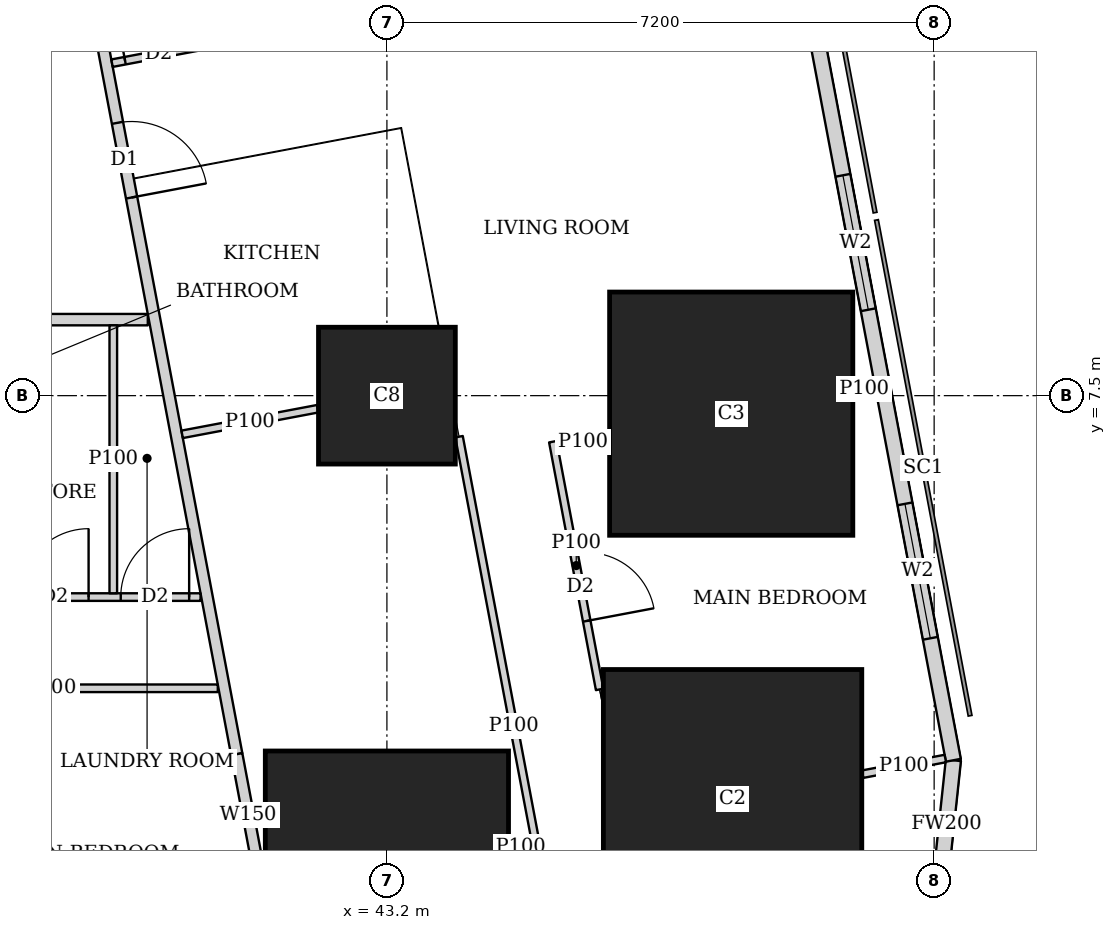
"""IFC4 building model, lengths in metres.
Left out: names, types, materials, properties, quantities, classifications, styles, units other than length and angle.
Written with IfcOpenShell. Run it as: python <this file> out.ifc"""

import sys

from ifc_helpers import new_model, si_unit, direction, frame, frame_2d, origin, origin_2d, place, context, subcontext, project, spatial, rectangle, extrude, element, fill, save


model = new_model("IFC4")
c1 = context("Model", 3, precision=1e-05, world=origin(), true_north=direction((0.0, 1.0)))
c2 = subcontext(c1, "Body", "Model", "MODEL_VIEW")
j1 = project(units=[si_unit("LENGTHUNIT", "METRE"), si_unit("PLANEANGLEUNIT", "RADIAN")], contexts=[c1])
p1 = place(None, origin())
s1 = spatial("IfcSite", under=j1, at=p1, CompositionType="ELEMENT")
p2 = place(p1, origin())
s2 = spatial("IfcBuilding", under=s1, at=p2, CompositionType="ELEMENT")
p3 = place(p2, frame((0.0, 0.0, 23.75)))
s3 = spatial("IfcBuildingStorey", under=s2, at=p3, CompositionType="ELEMENT", Elevation=23.75)
p4 = place(p3, frame((43.2, 1.225, 0.0), z_axis=(0.0, 0.0, 1.0), x_axis=(1.0, 0.0, 0.0)))
e1 = element("IfcColumn", 1, at=p4, inside=s3, PredefinedType="COLUMN", context=c2, shape_type="SweptSolid", body=[
    extrude(rectangle(XDim=3.2, YDim=3.2, at=origin_2d()), origin(), (0.0, 0.0, 1.0), 3.75),
])
p5 = place(p3, frame((47.748, 2.197, 0.0), z_axis=(0.0, 0.0, 1.0), x_axis=(1.0, 0.0, 0.0)))
e2 = element("IfcColumn", 2, at=p5, inside=s3, PredefinedType="COLUMN", context=c2, shape_type="SweptSolid", body=[
    extrude(rectangle(XDim=3.4, YDim=3.4, at=origin_2d()), origin(), (0.0, 0.0, 1.0), 3.75),
])
p6 = place(p3, frame((43.2, 7.5, 0.0), z_axis=(0.0, 0.0, 1.0), x_axis=(1.0, 0.0, 0.0)))
e3 = element("IfcColumn", 3, at=p6, inside=s3, PredefinedType="COLUMN", context=c2, shape_type="SweptSolid", body=[
    extrude(rectangle(XDim=1.8, YDim=1.8, at=origin_2d()), origin(), (0.0, 0.0, 1.0), 3.75),
])
p7 = place(p3, frame((47.73, 7.263, 0.0), z_axis=(0.0, 0.0, 1.0), x_axis=(1.0, 0.0, 0.0)))
e4 = element("IfcColumn", 4, at=p7, inside=s3, PredefinedType="COLUMN", context=c2, shape_type="SweptSolid", body=[
    extrude(rectangle(XDim=3.2, YDim=3.2, at=origin_2d()), origin(), (0.0, 0.0, 1.0), 3.75),
])
p8 = place(p3, frame((50.474, 1.025, 0.0), z_axis=(0.0, 0.0, 1.0), x_axis=(0.106047815515, 0.994361031429, 0.0)))
e5 = element("IfcWall", 5, at=p8, inside=s3, PredefinedType="SOLIDWALL", context=c2, shape_type="SweptSolid", body=[
    extrude(rectangle(XDim=1.688, YDim=0.2, at=frame_2d((0.844, 0.0))), origin(), (0.0, 0.0, 1.0), 3.5),
])
p9 = place(p3, frame((50.653, 2.703, 0.0), z_axis=(0.0, 0.0, 1.0), x_axis=(-0.185612026696, 0.982623109613, 0.0)))
e6 = element("IfcWall", 6, at=p9, inside=s3, PredefinedType="SOLIDWALL", context=c2, shape_type="SweptSolid", body=[
    extrude(rectangle(XDim=41.393, YDim=0.2, at=frame_2d((20.697, 0.0))), origin(), (0.0, 0.0, 1.0), 3.5),
])
p10 = place(p9, frame((1.633, 0.0, 0.9)))
e7 = element("IfcOpeningElement", 7, at=p10, cuts=e6, PredefinedType="OPENING", context=c2, shape_type="SweptSolid", body=[
    extrude(rectangle(XDim=1.8, YDim=1.5, at=frame_2d((0.9, 0.75))), frame((0.0, 0.11, 0.0), z_axis=(0.0, -1.0, 0.0), x_axis=(1.0, 0.0, 0.0)), (0.0, 0.0, 1.0), 0.22),
])
p11 = place(p9, frame((6.032, 0.0, 0.9)))
e8 = element("IfcOpeningElement", 8, at=p11, cuts=e6, PredefinedType="OPENING", context=c2, shape_type="SweptSolid", body=[
    extrude(rectangle(XDim=1.8, YDim=1.5, at=frame_2d((0.9, 0.75))), frame((0.0, 0.11, 0.0), z_axis=(0.0, -1.0, 0.0), x_axis=(1.0, 0.0, 0.0)), (0.0, 0.0, 1.0), 0.22),
])
p12 = place(p9, frame((9.848, 0.0, 0.9)))
e9 = element("IfcOpeningElement", 9, at=p12, cuts=e6, PredefinedType="OPENING", context=c2, shape_type="SweptSolid", body=[
    extrude(rectangle(XDim=1.8, YDim=1.5, at=frame_2d((0.9, 0.75))), frame((0.0, 0.11, 0.0), z_axis=(0.0, -1.0, 0.0), x_axis=(1.0, 0.0, 0.0)), (0.0, 0.0, 1.0), 0.22),
])
p13 = place(p9, frame((17.481, 0.0, 0.9)))
e10 = element("IfcOpeningElement", 10, at=p13, cuts=e6, PredefinedType="OPENING", context=c2, shape_type="SweptSolid", body=[
    extrude(rectangle(XDim=1.8, YDim=1.5, at=frame_2d((0.9, 0.75))), frame((0.0, 0.11, 0.0), z_axis=(0.0, -1.0, 0.0), x_axis=(1.0, 0.0, 0.0)), (0.0, 0.0, 1.0), 0.22),
])
p14 = place(p9, frame((21.297, 0.0, 0.9)))
e11 = element("IfcOpeningElement", 11, at=p14, cuts=e6, PredefinedType="OPENING", context=c2, shape_type="SweptSolid", body=[
    extrude(rectangle(XDim=1.8, YDim=1.5, at=frame_2d((0.9, 0.75))), frame((0.0, 0.11, 0.0), z_axis=(0.0, -1.0, 0.0), x_axis=(1.0, 0.0, 0.0)), (0.0, 0.0, 1.0), 0.22),
])
p15 = place(p9, frame((25.113, 0.0, 0.9)))
e12 = element("IfcOpeningElement", 12, at=p15, cuts=e6, PredefinedType="OPENING", context=c2, shape_type="SweptSolid", body=[
    extrude(rectangle(XDim=1.8, YDim=1.5, at=frame_2d((0.9, 0.75))), frame((0.0, 0.11, 0.0), z_axis=(0.0, -1.0, 0.0), x_axis=(1.0, 0.0, 0.0)), (0.0, 0.0, 1.0), 0.22),
])
p16 = place(p9, frame((28.93, 0.0, 0.9)))
e13 = element("IfcOpeningElement", 13, at=p16, cuts=e6, PredefinedType="OPENING", context=c2, shape_type="SweptSolid", body=[
    extrude(rectangle(XDim=1.8, YDim=1.5, at=frame_2d((0.9, 0.75))), frame((0.0, 0.11, 0.0), z_axis=(0.0, -1.0, 0.0), x_axis=(1.0, 0.0, 0.0)), (0.0, 0.0, 1.0), 0.22),
])
p17 = place(p9, frame((32.746, 0.0, 0.9)))
e14 = element("IfcOpeningElement", 14, at=p17, cuts=e6, PredefinedType="OPENING", context=c2, shape_type="SweptSolid", body=[
    extrude(rectangle(XDim=1.8, YDim=1.5, at=frame_2d((0.9, 0.75))), frame((0.0, 0.11, 0.0), z_axis=(0.0, -1.0, 0.0), x_axis=(1.0, 0.0, 0.0)), (0.0, 0.0, 1.0), 0.22),
])
p18 = place(p9, frame((36.481, 0.0, 0.9)))
e15 = element("IfcOpeningElement", 15, at=p18, cuts=e6, PredefinedType="OPENING", context=c2, shape_type="SweptSolid", body=[
    extrude(rectangle(XDim=1.8, YDim=1.5, at=frame_2d((0.9, 0.75))), frame((0.0, 0.11, 0.0), z_axis=(0.0, -1.0, 0.0), x_axis=(1.0, 0.0, 0.0)), (0.0, 0.0, 1.0), 0.22),
])
p19 = place(p3, frame((40.054, 8.5, 0.0), z_axis=(0.0, 0.0, 1.0), x_axis=(-1.0, 0.0, 0.0)))
e16 = element("IfcWall", 16, at=p19, inside=s3, PredefinedType="SOLIDWALL", context=c2, shape_type="SweptSolid", body=[
    extrude(rectangle(XDim=31.704, YDim=0.15, at=frame_2d((15.852, 0.0))), origin(), (0.0, 0.0, 1.0), 3.5),
])
p20 = place(p19, frame((27.321, 0.0, 0.0)))
e17 = element("IfcOpeningElement", 17, at=p20, cuts=e16, PredefinedType="OPENING", context=c2, shape_type="SweptSolid", body=[
    extrude(rectangle(XDim=1.0, YDim=2.1, at=frame_2d((0.5, 1.05))), frame((0.0, 0.085, 0.0), z_axis=(0.0, -1.0, 0.0), x_axis=(1.0, 0.0, 0.0)), (0.0, 0.0, 1.0), 0.17),
])
p21 = place(p19, frame((23.054, 0.0, 0.0)))
e18 = element("IfcOpeningElement", 18, at=p21, cuts=e16, PredefinedType="OPENING", context=c2, shape_type="SweptSolid", body=[
    extrude(rectangle(XDim=1.0, YDim=2.1, at=frame_2d((0.5, 1.05))), frame((0.0, 0.085, 0.0), z_axis=(0.0, -1.0, 0.0), x_axis=(1.0, 0.0, 0.0)), (0.0, 0.0, 1.0), 0.17),
])
p22 = place(p19, frame((15.754, 0.0, 0.0)))
e19 = element("IfcOpeningElement", 19, at=p22, cuts=e16, PredefinedType="OPENING", context=c2, shape_type="SweptSolid", body=[
    extrude(rectangle(XDim=1.0, YDim=2.1, at=frame_2d((0.5, 1.05))), frame((0.0, 0.085, 0.0), z_axis=(0.0, -1.0, 0.0), x_axis=(1.0, 0.0, 0.0)), (0.0, 0.0, 1.0), 0.17),
])
p23 = place(p19, frame((5.754, 0.0, 0.0)))
e20 = element("IfcOpeningElement", 20, at=p23, cuts=e16, PredefinedType="OPENING", context=c2, shape_type="SweptSolid", body=[
    extrude(rectangle(XDim=1.0, YDim=2.1, at=frame_2d((0.5, 1.05))), frame((0.0, 0.085, 0.0), z_axis=(0.0, -1.0, 0.0), x_axis=(1.0, 0.0, 0.0)), (0.0, 0.0, 1.0), 0.17),
])
p24 = place(p3, frame((33.755, 42.325, 0.0), z_axis=(0.0, 0.0, 1.0), x_axis=(0.185611461091, -0.982623216453, 0.0)))
e21 = element("IfcWall", 21, at=p24, inside=s3, PredefinedType="SOLIDWALL", context=c2, shape_type="SweptSolid", body=[
    extrude(rectangle(XDim=40.241, YDim=0.15, at=frame_2d((20.121, 0.0))), origin(), (0.0, 0.0, 1.0), 2.5),
])
p25 = place(p24, frame((7.325, 0.0, 0.0)))
e22 = element("IfcOpeningElement", 22, at=p25, cuts=e21, PredefinedType="OPENING", context=c2, shape_type="SweptSolid", body=[
    extrude(rectangle(XDim=1.0, YDim=2.1, at=frame_2d((0.5, 1.05))), frame((0.0, 0.085, 0.0), z_axis=(0.0, -1.0, 0.0), x_axis=(1.0, 0.0, 0.0)), (0.0, 0.0, 1.0), 0.17),
])
p26 = place(p24, frame((11.902, 0.0, 0.0)))
e23 = element("IfcOpeningElement", 23, at=p26, cuts=e21, PredefinedType="OPENING", context=c2, shape_type="SweptSolid", body=[
    extrude(rectangle(XDim=1.0, YDim=2.1, at=frame_2d((0.5, 1.05))), frame((0.0, 0.085, 0.0), z_axis=(0.0, -1.0, 0.0), x_axis=(1.0, 0.0, 0.0)), (0.0, 0.0, 1.0), 0.17),
])
p27 = place(p24, frame((25.718, 0.0, 0.0)))
e24 = element("IfcOpeningElement", 24, at=p27, cuts=e21, PredefinedType="OPENING", context=c2, shape_type="SweptSolid", body=[
    extrude(rectangle(XDim=1.0, YDim=2.1, at=frame_2d((0.5, 1.05))), frame((0.0, 0.085, 0.0), z_axis=(0.0, -1.0, 0.0), x_axis=(1.0, 0.0, 0.0)), (0.0, 0.0, 1.0), 0.17),
])
p28 = place(p24, frame((31.788, 0.0, 0.0)))
e25 = element("IfcOpeningElement", 25, at=p28, cuts=e21, PredefinedType="OPENING", context=c2, shape_type="SweptSolid", body=[
    extrude(rectangle(XDim=1.0, YDim=2.1, at=frame_2d((0.5, 1.05))), frame((0.0, 0.085, 0.0), z_axis=(0.0, -1.0, 0.0), x_axis=(1.0, 0.0, 0.0)), (0.0, 0.0, 1.0), 0.17),
])
p29 = place(p3, frame((41.224, 2.783, 0.0), z_axis=(0.0, 0.0, 1.0), x_axis=(0.185566507215, -0.982631706897, 0.0)))
e26 = element("IfcWall", 26, at=p29, inside=s3, PredefinedType="SOLIDWALL", context=c2, shape_type="SweptSolid", body=[
    extrude(rectangle(XDim=1.626, YDim=0.15, at=frame_2d((0.813, 0.0))), origin(), (0.0, 0.0, 1.0), 2.05),
])
p30 = place(p3, frame((40.975, 3.65, 0.0), z_axis=(0.0, 0.0, 1.0), x_axis=(-1.0, 0.0, 0.0)))
e27 = element("IfcWall", 27, at=p30, inside=s3, PredefinedType="PARTITIONING", context=c2, shape_type="SweptSolid", body=[
    extrude(rectangle(XDim=4.975, YDim=0.1, at=frame_2d((2.488, 0.0))), origin(), (0.0, 0.0, 1.0), 3.5),
])
p31 = place(p30, frame((2.45, 0.0, 0.0)))
e28 = element("IfcOpeningElement", 28, at=p31, cuts=e27, PredefinedType="OPENING", context=c2, shape_type="SweptSolid", body=[
    extrude(rectangle(XDim=0.9, YDim=2.1, at=frame_2d((0.45, 1.05))), frame((0.0, 0.06, 0.0), z_axis=(0.0, -1.0, 0.0), x_axis=(1.0, 0.0, 0.0)), (0.0, 0.0, 1.0), 0.12),
])
p32 = place(p3, frame((40.748, 4.85, 0.0), z_axis=(0.0, 0.0, 1.0), x_axis=(-1.0, 0.0, 0.0)))
e29 = element("IfcWall", 29, at=p32, inside=s3, PredefinedType="PARTITIONING", context=c2, shape_type="SweptSolid", body=[
    extrude(rectangle(XDim=4.748, YDim=0.1, at=frame_2d((2.374, 0.0))), origin(), (0.0, 0.0, 1.0), 3.5),
])
p33 = place(p32, frame((3.273, 0.0, 0.0)))
e30 = element("IfcOpeningElement", 30, at=p33, cuts=e29, PredefinedType="OPENING", context=c2, shape_type="SweptSolid", body=[
    extrude(rectangle(XDim=0.9, YDim=2.1, at=frame_2d((0.45, 1.05))), frame((0.0, 0.06, 0.0), z_axis=(0.0, -1.0, 0.0), x_axis=(1.0, 0.0, 0.0)), (0.0, 0.0, 1.0), 0.12),
])
p34 = place(p32, frame((0.15, 0.0, 0.0)))
e31 = element("IfcOpeningElement", 31, at=p34, cuts=e29, PredefinedType="OPENING", context=c2, shape_type="SweptSolid", body=[
    extrude(rectangle(XDim=0.9, YDim=2.1, at=frame_2d((0.45, 1.05))), frame((0.0, 0.06, 0.0), z_axis=(0.0, -1.0, 0.0), x_axis=(1.0, 0.0, 0.0)), (0.0, 0.0, 1.0), 0.12),
])
p35 = place(p32, frame((1.473, 0.0, 0.0)))
e32 = element("IfcOpeningElement", 32, at=p35, cuts=e29, PredefinedType="OPENING", context=c2, shape_type="SweptSolid", body=[
    extrude(rectangle(XDim=0.9, YDim=2.1, at=frame_2d((0.45, 1.05))), frame((0.0, 0.06, 0.0), z_axis=(0.0, -1.0, 0.0), x_axis=(1.0, 0.0, 0.0)), (0.0, 0.0, 1.0), 0.12),
])
p36 = place(p3, frame((39.6, 4.9, 0.0), z_axis=(0.0, 0.0, 1.0), x_axis=(0.0, 1.0, 0.0)))
e33 = element("IfcWall", 33, at=p36, inside=s3, PredefinedType="PARTITIONING", context=c2, shape_type="SweptSolid", body=[
    extrude(rectangle(XDim=3.525, YDim=0.1, at=frame_2d((1.763, 0.0))), origin(), (0.0, 0.0, 1.0), 3.5),
])
p37 = place(p3, frame((43.145, 12.547, 0.0), z_axis=(0.0, 0.0, 1.0), x_axis=(-0.982610451136, -0.185679027675, 0.0)))
e34 = element("IfcWall", 34, at=p37, inside=s3, PredefinedType="PARTITIONING", context=c2, shape_type="SweptSolid", body=[
    extrude(rectangle(XDim=3.625, YDim=0.1, at=frame_2d((1.812, 0.0))), origin(), (0.0, 0.0, 1.0), 3.5),
])
p38 = place(p37, frame((2.55, 0.0, 0.0)))
e35 = element("IfcOpeningElement", 35, at=p38, cuts=e34, PredefinedType="OPENING", context=c2, shape_type="SweptSolid", body=[
    extrude(rectangle(XDim=0.9, YDim=2.1, at=frame_2d((0.45, 1.05))), frame((0.0, 0.06, 0.0), z_axis=(0.0, -1.0, 0.0), x_axis=(1.0, 0.0, 0.0)), (0.0, 0.0, 1.0), 0.12),
])
p39 = place(p3, frame((45.383, 6.894, 0.0), z_axis=(0.0, 0.0, 1.0), x_axis=(0.185714962489, -0.982603660032, 0.0)))
e36 = element("IfcWall", 36, at=p39, inside=s3, PredefinedType="PARTITIONING", context=c2, shape_type="SweptSolid", body=[
    extrude(rectangle(XDim=3.317, YDim=0.1, at=frame_2d((1.658, 0.0))), origin(), (0.0, 0.0, 1.0), 3.5),
])
p40 = place(p39, frame((1.5, 0.0, 0.0)))
e37 = element("IfcOpeningElement", 37, at=p40, cuts=e36, PredefinedType="OPENING", context=c2, shape_type="SweptSolid", body=[
    extrude(rectangle(XDim=0.9, YDim=2.1, at=frame_2d((0.45, 1.05))), frame((0.0, 0.06, 0.0), z_axis=(0.0, -1.0, 0.0), x_axis=(1.0, 0.0, 0.0)), (0.0, 0.0, 1.0), 0.12),
])
p41 = place(p3, frame((44.149, 6.96, 0.0), z_axis=(0.0, 0.0, 1.0), x_axis=(0.185677796828, -0.982610683722, 0.0)))
e38 = element("IfcWall", 38, at=p41, inside=s3, PredefinedType="PARTITIONING", context=c2, shape_type="SweptSolid", body=[
    extrude(rectangle(XDim=7.745, YDim=0.1, at=frame_2d((3.872, 0.0))), origin(), (0.0, 0.0, 1.0), 2.1),
])
p42 = place(p3, frame((49.622, 7.62, 0.0), z_axis=(0.0, 0.0, 1.0), x_axis=(-0.982649953213, -0.185469861299, 0.0)))
e39 = element("IfcWall", 39, at=p42, inside=s3, PredefinedType="PARTITIONING", context=c2, shape_type="SweptSolid", body=[
    extrude(rectangle(XDim=0.287, YDim=0.1, at=frame_2d((0.144, 0.0))), origin(), (0.0, 0.0, 1.0), 3.5),
])
p43 = place(p3, frame((46.12, 6.959, 0.0), z_axis=(0.0, 0.0, 1.0), x_axis=(-0.982722777639, -0.185083608972, 0.0)))
e40 = element("IfcWall", 40, at=p43, inside=s3, PredefinedType="PARTITIONING", context=c2, shape_type="SweptSolid", body=[
    extrude(rectangle(XDim=0.686, YDim=0.1, at=frame_2d((0.343, 0.0))), origin(), (0.0, 0.0, 1.0), 3.5),
])
p44 = place(p3, frame((50.547, 2.726, 0.0), z_axis=(0.0, 0.0, 1.0), x_axis=(-0.982569158372, -0.185897415303, 0.0)))
e41 = element("IfcWall", 41, at=p44, inside=s3, PredefinedType="PARTITIONING", context=c2, shape_type="SweptSolid", body=[
    extrude(rectangle(XDim=1.108, YDim=0.1, at=frame_2d((0.554, 0.0))), origin(), (0.0, 0.0, 1.0), 3.5),
])
p45 = place(p3, frame((42.29, 7.328, 0.0), z_axis=(0.0, 0.0, 1.0), x_axis=(-0.98262927905, -0.185579362952, 0.0)))
e42 = element("IfcWall", 42, at=p45, inside=s3, PredefinedType="PARTITIONING", context=c2, shape_type="SweptSolid", body=[
    extrude(rectangle(XDim=1.815, YDim=0.1, at=frame_2d((0.908, 0.0))), origin(), (0.0, 0.0, 1.0), 3.5),
])
p46 = place(p3, frame((45.114, 1.587, 0.0), z_axis=(0.0, 0.0, 1.0), x_axis=(-0.982934694903, -0.183954846516, 0.0)))
e43 = element("IfcWall", 43, at=p46, inside=s3, PredefinedType="PARTITIONING", context=c2, shape_type="SweptSolid", body=[
    extrude(rectangle(XDim=0.309, YDim=0.1, at=frame_2d((0.155, 0.0))), origin(), (0.0, 0.0, 1.0), 2.1),
])
p47 = place(p10, origin())
e44 = element("IfcWindow", 44, at=p47, inside=s3, PartitioningType="SINGLE_PANEL", PredefinedType="WINDOW", context=c2, shape_type="SweptSolid", body=[
    extrude(rectangle(XDim=1.8, YDim=1.5, at=frame_2d((0.9, 0.75))), frame((0.0, 0.03, 0.0), z_axis=(0.0, -1.0, 0.0), x_axis=(1.0, 0.0, 0.0)), (0.0, 0.0, 1.0), 0.06),
])
fill(e7, e44)
p48 = place(p11, origin())
e45 = element("IfcWindow", 45, at=p48, inside=s3, PartitioningType="SINGLE_PANEL", PredefinedType="WINDOW", context=c2, shape_type="SweptSolid", body=[
    extrude(rectangle(XDim=1.8, YDim=1.5, at=frame_2d((0.9, 0.75))), frame((0.0, 0.03, 0.0), z_axis=(0.0, -1.0, 0.0), x_axis=(1.0, 0.0, 0.0)), (0.0, 0.0, 1.0), 0.06),
])
fill(e8, e45)
p49 = place(p34, origin())
e46 = element("IfcDoor", 46, at=p49, inside=s3, OperationType="SINGLE_SWING_RIGHT", PredefinedType="DOOR", context=c2, shape_type="SweptSolid", body=[
    extrude(rectangle(XDim=0.9, YDim=2.1, at=frame_2d((0.45, 1.05))), frame((0.0, 0.025, 0.0), z_axis=(0.0, -1.0, 0.0), x_axis=(1.0, 0.0, 0.0)), (0.0, 0.0, 1.0), 0.05),
])
fill(e31, e46)
p50 = place(p35, origin())
e47 = element("IfcDoor", 47, at=p50, inside=s3, OperationType="SINGLE_SWING_RIGHT", PredefinedType="DOOR", context=c2, shape_type="SweptSolid", body=[
    extrude(rectangle(XDim=0.9, YDim=2.1, at=frame_2d((0.45, 1.05))), frame((0.0, 0.025, 0.0), z_axis=(0.0, -1.0, 0.0), x_axis=(1.0, 0.0, 0.0)), (0.0, 0.0, 1.0), 0.05),
])
fill(e32, e47)
p51 = place(p38, origin())
e48 = element("IfcDoor", 48, at=p51, inside=s3, OperationType="SINGLE_SWING_LEFT", PredefinedType="DOOR", context=c2, shape_type="SweptSolid", body=[
    extrude(rectangle(XDim=0.9, YDim=2.1, at=frame_2d((0.45, 1.05))), frame((0.0, 0.025, 0.0), z_axis=(0.0, -1.0, 0.0), x_axis=(1.0, 0.0, 0.0)), (0.0, 0.0, 1.0), 0.05),
])
fill(e35, e48)
p52 = place(p40, origin())
e49 = element("IfcDoor", 49, at=p52, inside=s3, OperationType="SINGLE_SWING_RIGHT", PredefinedType="DOOR", context=c2, shape_type="SweptSolid", body=[
    extrude(rectangle(XDim=0.9, YDim=2.1, at=frame_2d((0.45, 1.05))), frame((0.0, 0.025, 0.0), z_axis=(0.0, -1.0, 0.0), x_axis=(1.0, 0.0, 0.0)), (0.0, 0.0, 1.0), 0.05),
])
fill(e37, e49)
p53 = place(p28, origin())
e50 = element("IfcDoor", 50, at=p53, inside=s3, OperationType="SINGLE_SWING_RIGHT", PredefinedType="DOOR", context=c2, shape_type="SweptSolid", body=[
    extrude(rectangle(XDim=1.0, YDim=2.1, at=frame_2d((0.5, 1.05))), frame((0.0, 0.025, 0.0), z_axis=(0.0, -1.0, 0.0), x_axis=(1.0, 0.0, 0.0)), (0.0, 0.0, 1.0), 0.05),
])
fill(e25, e50)
save(model, sys.argv[1])
